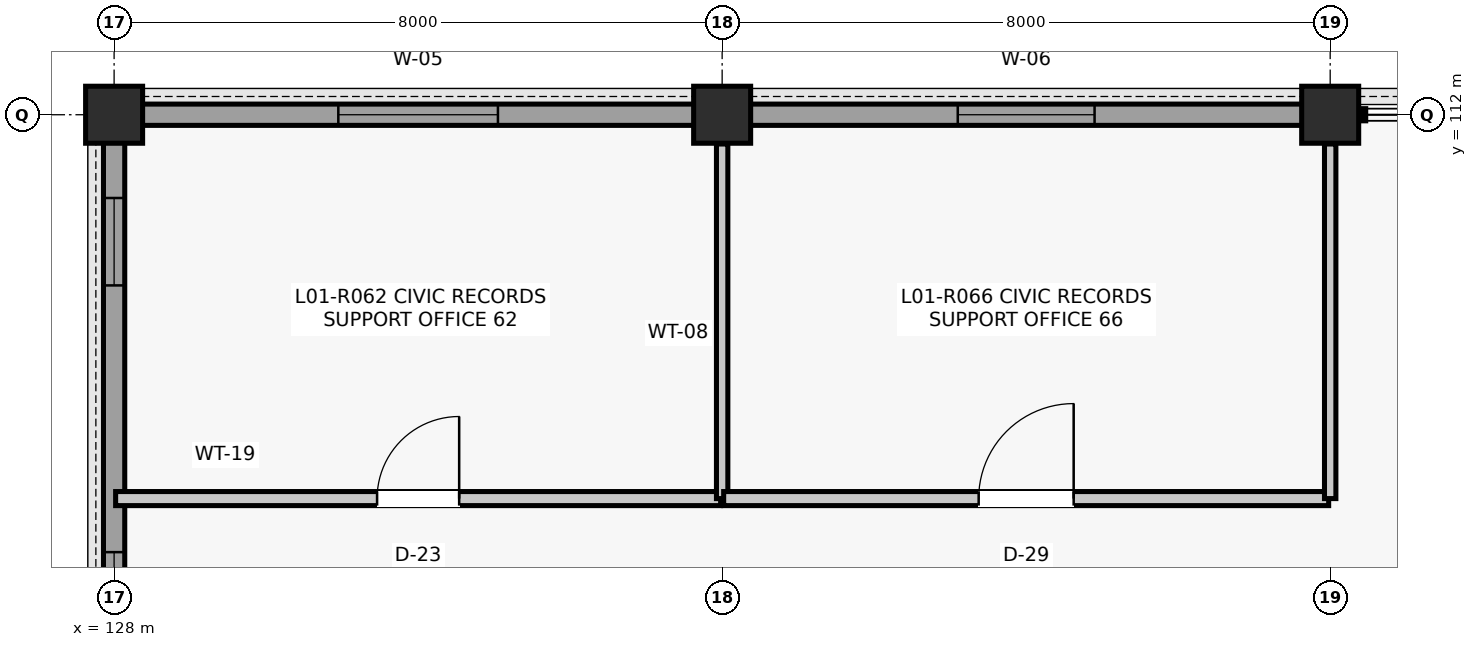
"""IFC4 building model, lengths in metres.
Left out: names, types, materials, properties, quantities, classifications, styles, units other than length and angle.
Written with IfcOpenShell. Run it as: python <this file> out.ifc"""

import sys

from ifc_helpers import new_model, si_unit, direction, frame, frame_2d, origin, origin_2d, place, context, subcontext, project, spatial, rectangle, extrude, element, fill, save


model = new_model("IFC4")
c1 = context("Model", 3, precision=1e-05, world=origin(), true_north=direction((0.0, 1.0)))
c2 = subcontext(c1, "Body", "Model", "MODEL_VIEW")
j1 = project(units=[si_unit("LENGTHUNIT", "METRE"), si_unit("PLANEANGLEUNIT", "RADIAN")], contexts=[c1])
p1 = place(None, origin())
s1 = spatial("IfcSite", under=j1, at=p1, CompositionType="ELEMENT")
p2 = place(p1, origin())
s2 = spatial("IfcBuilding", under=s1, at=p2, CompositionType="ELEMENT")
p3 = place(p2, frame((0.0, 0.0, 5.28)))
s3 = spatial("IfcBuildingStorey", under=s2, at=p3, CompositionType="ELEMENT", Elevation=5.28)
for number, where, z_axis, x_axis in (
    (1, (128.0, 112.0, 0.0), (0.0, 0.0, 1.0), (1.0, 0.0, 0.0)),
    (2, (136.0, 112.0, 0.0), (0.0, 0.0, 1.0), (1.0, 0.0, 0.0)),
    (3, (144.0, 112.0, 0.0), (0.0, 0.0, 1.0), (1.0, 0.0, 0.0)),
):
    element("IfcColumn", number, at=place(p3, frame(where, z_axis=z_axis, x_axis=x_axis)), inside=s3, PredefinedType="COLUMN", context=c2, shape_type="SweptSolid", body=[
        extrude(rectangle(XDim=0.75, YDim=0.75, at=origin_2d()), origin(), (0.0, 0.0, 1.0), 4.62),
    ])
p4 = place(p3, frame((128.36, 112.0, 0.0), z_axis=(0.0, 0.0, 1.0), x_axis=(1.0, 0.0, 0.0)))
e4 = element("IfcWall", 4, at=p4, inside=s3, PredefinedType="SOLIDWALL", context=c2, shape_type="SweptSolid", body=[
    extrude(rectangle(XDim=7.28, YDim=0.28, at=frame_2d((3.64, 0.0))), origin(), (0.0, 0.0, 1.0), 3.977),
])
p5 = place(p4, frame((2.59, 0.0, 0.9)))
e5 = element("IfcOpeningElement", 5, at=p5, cuts=e4, PredefinedType="OPENING", context=c2, shape_type="SweptSolid", body=[
    extrude(rectangle(XDim=2.1, YDim=2.4, at=frame_2d((1.05, 1.2))), frame((0.0, 0.15, 0.0), z_axis=(0.0, -1.0, 0.0), x_axis=(1.0, 0.0, 0.0)), (0.0, 0.0, 1.0), 0.3),
])
p6 = place(p3, frame((128.0, 104.36, 0.0), z_axis=(0.0, 0.0, 1.0), x_axis=(0.0, 1.0, 0.0)))
e6 = element("IfcWall", 6, at=p6, inside=s3, PredefinedType="SOLIDWALL", context=c2, shape_type="SweptSolid", body=[
    extrude(rectangle(XDim=7.28, YDim=0.28, at=frame_2d((3.64, 0.0))), origin(), (0.0, 0.0, 1.0), 3.914),
])
p7 = place(p6, frame((0.735, 0.0, 0.95)))
e7 = element("IfcOpeningElement", 7, at=p7, cuts=e6, PredefinedType="OPENING", context=c2, shape_type="SweptSolid", body=[
    extrude(rectangle(XDim=1.15, YDim=1.65, at=frame_2d((0.575, 0.825))), frame((0.0, 0.15, 0.0), z_axis=(0.0, -1.0, 0.0), x_axis=(1.0, 0.0, 0.0)), (0.0, 0.0, 1.0), 0.3),
])
p8 = place(p6, frame((5.395, 0.0, 0.95)))
e8 = element("IfcOpeningElement", 8, at=p8, cuts=e6, PredefinedType="OPENING", context=c2, shape_type="SweptSolid", body=[
    extrude(rectangle(XDim=1.15, YDim=1.65, at=frame_2d((0.575, 0.825))), frame((0.0, 0.15, 0.0), z_axis=(0.0, -1.0, 0.0), x_axis=(1.0, 0.0, 0.0)), (0.0, 0.0, 1.0), 0.3),
])
p9 = place(p3, frame((136.36, 112.0, 0.0), z_axis=(0.0, 0.0, 1.0), x_axis=(1.0, 0.0, 0.0)))
e9 = element("IfcWall", 9, at=p9, inside=s3, PredefinedType="SOLIDWALL", context=c2, shape_type="SweptSolid", body=[
    extrude(rectangle(XDim=7.28, YDim=0.28, at=frame_2d((3.64, 0.0))), origin(), (0.0, 0.0, 1.0), 3.955),
])
p10 = place(p9, frame((2.74, 0.0, 0.9)))
e10 = element("IfcOpeningElement", 10, at=p10, cuts=e9, PredefinedType="OPENING", context=c2, shape_type="SweptSolid", body=[
    extrude(rectangle(XDim=1.8, YDim=2.3, at=frame_2d((0.9, 1.15))), frame((0.0, 0.15, 0.0), z_axis=(0.0, -1.0, 0.0), x_axis=(1.0, 0.0, 0.0)), (0.0, 0.0, 1.0), 0.3),
])
p11 = place(p3, frame((128.02, 106.95, 0.0), z_axis=(0.0, 0.0, 1.0), x_axis=(1.0, 0.0, 0.0)))
e11 = element("IfcWall", 11, at=p11, inside=s3, PredefinedType="PARTITIONING", context=c2, shape_type="SweptSolid", body=[
    extrude(rectangle(XDim=7.96, YDim=0.185, at=frame_2d((3.98, 0.0))), origin(), (0.0, 0.0, 1.0), 3.781),
])
p12 = place(p11, frame((3.44, 0.0, 0.0)))
e12 = element("IfcOpeningElement", 12, at=p12, cuts=e11, PredefinedType="OPENING", context=c2, shape_type="SweptSolid", body=[
    extrude(rectangle(XDim=1.08, YDim=2.2, at=frame_2d((0.54, 1.1))), frame((0.0, 0.103, 0.0), z_axis=(0.0, -1.0, 0.0), x_axis=(1.0, 0.0, 0.0)), (0.0, 0.0, 1.0), 0.205),
])
p13 = place(p3, frame((136.0, 106.95, 0.0), z_axis=(0.0, 0.0, 1.0), x_axis=(0.0, 1.0, 0.0)))
e13 = element("IfcWall", 13, at=p13, inside=s3, PredefinedType="PARTITIONING", context=c2, shape_type="SweptSolid", body=[
    extrude(rectangle(XDim=4.665, YDim=0.15, at=frame_2d((2.333, 0.0))), origin(), (0.0, 0.0, 1.0), 3.781),
])
p14 = place(p3, frame((136.02, 106.95, 0.0), z_axis=(0.0, 0.0, 1.0), x_axis=(1.0, 0.0, 0.0)))
e14 = element("IfcWall", 14, at=p14, inside=s3, PredefinedType="PARTITIONING", context=c2, shape_type="SweptSolid", body=[
    extrude(rectangle(XDim=7.96, YDim=0.185, at=frame_2d((3.98, 0.0))), origin(), (0.0, 0.0, 1.0), 3.781),
])
p15 = place(p14, frame((3.355, 0.0, 0.0)))
e15 = element("IfcOpeningElement", 15, at=p15, cuts=e14, PredefinedType="OPENING", context=c2, shape_type="SweptSolid", body=[
    extrude(rectangle(XDim=1.25, YDim=2.18, at=frame_2d((0.625, 1.09))), frame((0.0, 0.103, 0.0), z_axis=(0.0, -1.0, 0.0), x_axis=(1.0, 0.0, 0.0)), (0.0, 0.0, 1.0), 0.205),
])
p16 = place(p3, frame((144.0, 106.95, 0.0), z_axis=(0.0, 0.0, 1.0), x_axis=(0.0, 1.0, 0.0)))
e16 = element("IfcWall", 16, at=p16, inside=s3, PredefinedType="PARTITIONING", context=c2, shape_type="SweptSolid", body=[
    extrude(rectangle(XDim=4.665, YDim=0.15, at=frame_2d((2.333, 0.0))), origin(), (0.0, 0.0, 1.0), 3.896),
])
p17 = place(p5, origin())
e17 = element("IfcWindow", 17, at=p17, inside=s3, PartitioningType="SINGLE_PANEL", PredefinedType="WINDOW", context=c2, shape_type="SweptSolid", body=[
    extrude(rectangle(XDim=2.1, YDim=2.4, at=frame_2d((1.05, 1.2))), frame((0.0, 0.03, 0.0), z_axis=(0.0, -1.0, 0.0), x_axis=(1.0, 0.0, 0.0)), (0.0, 0.0, 1.0), 0.06),
])
fill(e5, e17)
p18 = place(p7, origin())
e18 = element("IfcWindow", 18, at=p18, inside=s3, PartitioningType="SINGLE_PANEL", PredefinedType="WINDOW", context=c2, shape_type="SweptSolid", body=[
    extrude(rectangle(XDim=1.15, YDim=1.65, at=frame_2d((0.575, 0.825))), frame((0.0, 0.03, 0.0), z_axis=(0.0, -1.0, 0.0), x_axis=(1.0, 0.0, 0.0)), (0.0, 0.0, 1.0), 0.06),
])
fill(e7, e18)
p19 = place(p8, origin())
e19 = element("IfcWindow", 19, at=p19, inside=s3, PartitioningType="SINGLE_PANEL", PredefinedType="WINDOW", context=c2, shape_type="SweptSolid", body=[
    extrude(rectangle(XDim=1.15, YDim=1.65, at=frame_2d((0.575, 0.825))), frame((0.0, 0.03, 0.0), z_axis=(0.0, -1.0, 0.0), x_axis=(1.0, 0.0, 0.0)), (0.0, 0.0, 1.0), 0.06),
])
fill(e8, e19)
p20 = place(p10, origin())
e20 = element("IfcWindow", 20, at=p20, inside=s3, PartitioningType="SINGLE_PANEL", PredefinedType="WINDOW", context=c2, shape_type="SweptSolid", body=[
    extrude(rectangle(XDim=1.8, YDim=2.3, at=frame_2d((0.9, 1.15))), frame((0.0, 0.03, 0.0), z_axis=(0.0, -1.0, 0.0), x_axis=(1.0, 0.0, 0.0)), (0.0, 0.0, 1.0), 0.06),
])
fill(e10, e20)
p21 = place(p12, origin())
e21 = element("IfcDoor", 21, at=p21, inside=s3, OperationType="SINGLE_SWING_RIGHT", PredefinedType="DOOR", context=c2, shape_type="SweptSolid", body=[
    extrude(rectangle(XDim=1.08, YDim=2.2, at=frame_2d((0.54, 1.1))), frame((0.0, 0.025, 0.0), z_axis=(0.0, -1.0, 0.0), x_axis=(1.0, 0.0, 0.0)), (0.0, 0.0, 1.0), 0.05),
])
fill(e12, e21)
p22 = place(p15, origin())
e22 = element("IfcDoor", 22, at=p22, inside=s3, OperationType="SINGLE_SWING_RIGHT", PredefinedType="DOOR", context=c2, shape_type="SweptSolid", body=[
    extrude(rectangle(XDim=1.25, YDim=2.18, at=frame_2d((0.625, 1.09))), frame((0.0, 0.025, 0.0), z_axis=(0.0, -1.0, 0.0), x_axis=(1.0, 0.0, 0.0)), (0.0, 0.0, 1.0), 0.05),
])
fill(e15, e22)
save(model, sys.argv[1])
